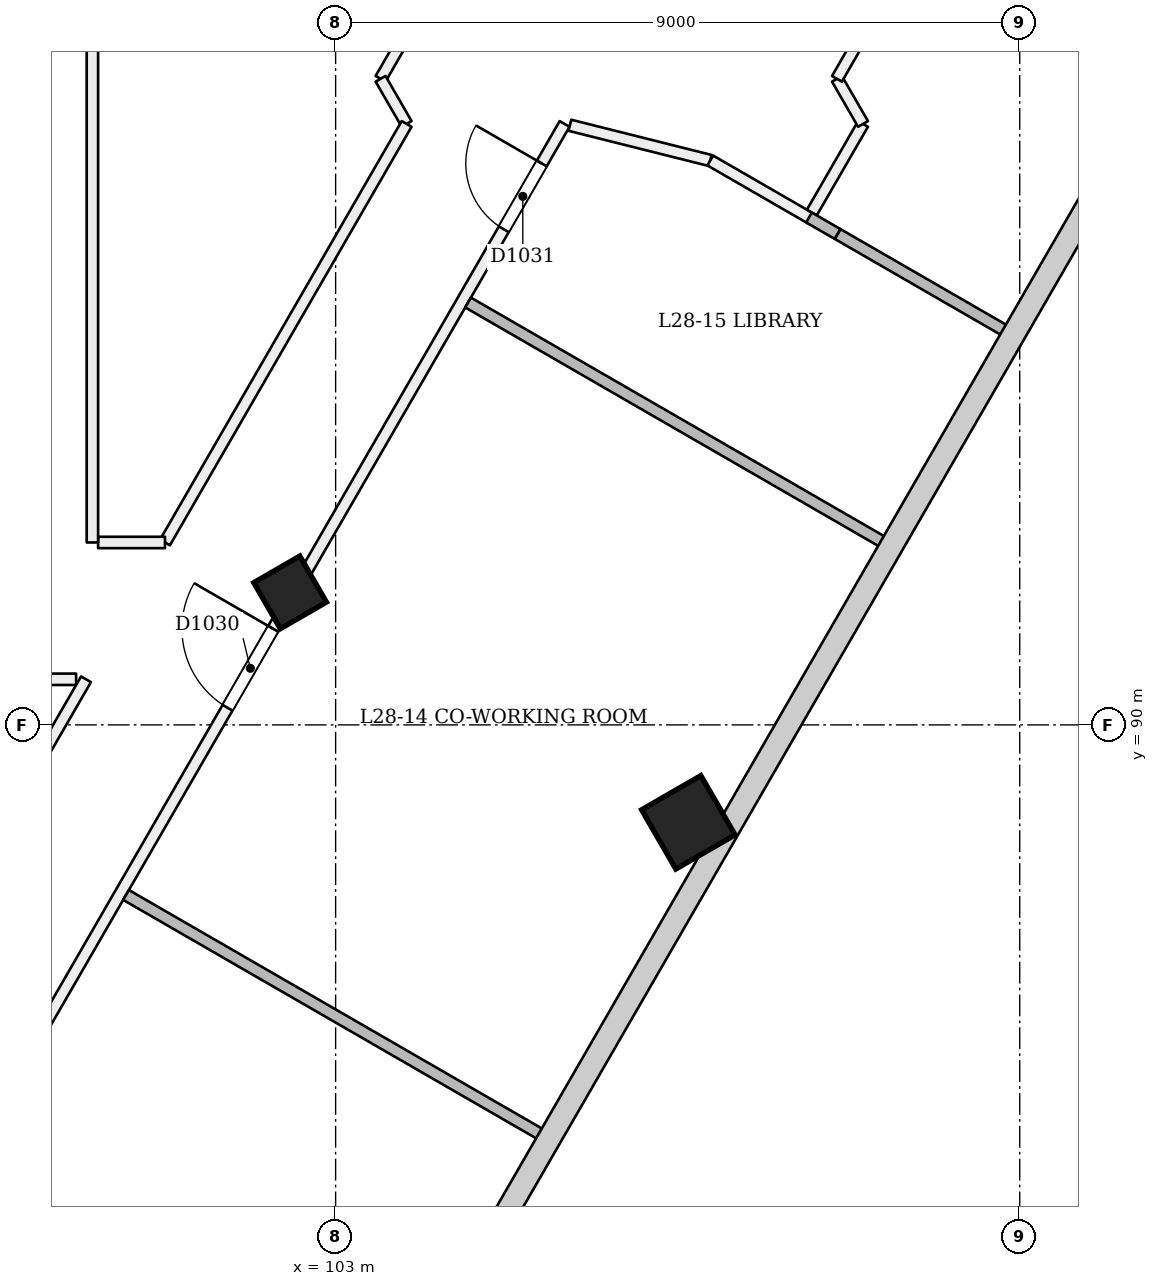
"""IFC4 building model, lengths in metres.
Left out: names, types, materials, properties, quantities, classifications, styles, units other than length and angle.
Written with IfcOpenShell. Run it as: python <this file> out.ifc"""

import sys

from ifc_helpers import new_model, si_unit, direction, frame, frame_2d, origin, origin_2d, place, context, subcontext, project, spatial, rectangle, extrude, element, fill, save


model = new_model("IFC4")
c1 = context("Model", 3, precision=1e-05, world=origin(), true_north=direction((0.0, 1.0)))
c2 = subcontext(c1, "Body", "Model", "MODEL_VIEW")
j1 = project(units=[si_unit("LENGTHUNIT", "METRE"), si_unit("PLANEANGLEUNIT", "RADIAN")], contexts=[c1])
p1 = place(None, origin())
s1 = spatial("IfcSite", under=j1, at=p1, CompositionType="ELEMENT")
p2 = place(p1, origin())
s2 = spatial("IfcBuilding", under=s1, at=p2, CompositionType="ELEMENT")
p3 = place(p2, frame((0.0, 0.0, 111.6)))
s3 = spatial("IfcBuildingStorey", under=s2, at=p3, CompositionType="ELEMENT", Elevation=111.6)
p4 = place(p3, frame((102.428, 91.696, -0.021), z_axis=(-0.022155133694, 0.038483534979, 0.999013597298), x_axis=(-0.501317552426, -0.864978472218, 0.022202572572)))
e1 = element("IfcColumn", 1, at=p4, inside=s3, PredefinedType="COLUMN", context=c2, shape_type="SweptSolid", body=[
    extrude(rectangle(XDim=0.7, YDim=0.7, at=origin_2d()), origin(), (0.0, 0.0, 1.0), 3.604),
])
p5 = place(p3, frame((107.668, 88.671, -0.027), z_axis=(-0.022222910879, 0.038415824599, 0.999014697916), x_axis=(-0.499512944036, -0.866022178858, 0.022190188523)))
e2 = element("IfcColumn", 2, at=p5, inside=s3, PredefinedType="COLUMN", context=c2, shape_type="SweptSolid", body=[
    extrude(rectangle(XDim=0.9, YDim=0.9, at=origin_2d()), origin(), (0.0, 0.0, 1.0), 3.604),
])
p6 = place(p3, frame((88.0, 90.599, 0.0), z_axis=(0.0, 0.0, 1.0), x_axis=(0.999999996448, 8.429038e-05, 0.0)))
e3 = element("IfcWall", 3, at=p6, inside=s3, PredefinedType="PARTITIONING", context=c2, shape_type="SweptSolid", body=[
    extrude(rectangle(XDim=11.586, YDim=0.15, at=frame_2d((5.793, 0.0))), origin(), (0.0, 0.0, 1.0), 3.1),
])
p7 = place(p6, frame((2.465, 0.0, 0.0)))
e4 = element("IfcOpeningElement", 4, at=p7, cuts=e3, PredefinedType="OPENING", context=c2, shape_type="SweptSolid", body=[
    extrude(rectangle(XDim=1.0, YDim=2.1, at=frame_2d((0.5, 1.05))), frame((0.0, 0.085, 0.0), z_axis=(0.0, -1.0, 0.0), x_axis=(1.0, 0.0, 0.0)), (0.0, 0.0, 1.0), 0.171),
])
p8 = place(p3, frame((99.716, 90.6, 0.0), z_axis=(0.0, 0.0, 1.0), x_axis=(-0.500001331159, -0.866024635238, 0.0)))
e5 = element("IfcWall", 5, at=p8, inside=s3, PredefinedType="PARTITIONING", context=c2, shape_type="SweptSolid", body=[
    extrude(rectangle(XDim=29.302, YDim=0.15, at=frame_2d((14.651, 0.0))), origin(), (0.0, 0.0, 1.0), 3.1),
])
p9 = place(p8, frame((2.192, 0.0, 0.0)))
e6 = element("IfcOpeningElement", 6, at=p9, cuts=e5, PredefinedType="OPENING", context=c2, shape_type="SweptSolid", body=[
    extrude(rectangle(XDim=0.9, YDim=2.1, at=frame_2d((0.45, 1.05))), frame((0.0, 0.085, 0.0), z_axis=(0.0, -1.0, 0.0), x_axis=(1.0, 0.0, 0.0)), (0.0, 0.0, 1.0), 0.171),
])
p10 = place(p8, frame((5.182, 0.0, 0.0)))
e7 = element("IfcOpeningElement", 7, at=p10, cuts=e5, PredefinedType="OPENING", context=c2, shape_type="SweptSolid", body=[
    extrude(rectangle(XDim=0.9, YDim=2.1, at=frame_2d((0.45, 1.05))), frame((0.0, 0.085, 0.0), z_axis=(0.0, -1.0, 0.0), x_axis=(1.0, 0.0, 0.0)), (0.0, 0.0, 1.0), 0.171),
])
p11 = place(p8, frame((15.001, 0.0, 0.0)))
e8 = element("IfcOpeningElement", 8, at=p11, cuts=e5, PredefinedType="OPENING", context=c2, shape_type="SweptSolid", body=[
    extrude(rectangle(XDim=1.0, YDim=2.1, at=frame_2d((0.5, 1.05))), frame((0.0, 0.085, 0.0), z_axis=(0.0, -1.0, 0.0), x_axis=(1.0, 0.0, 0.0)), (0.0, 0.0, 1.0), 0.171),
])
p12 = place(p8, frame((18.236, 0.0, 0.0)))
e9 = element("IfcOpeningElement", 9, at=p12, cuts=e5, PredefinedType="OPENING", context=c2, shape_type="SweptSolid", body=[
    extrude(rectangle(XDim=1.0, YDim=2.1, at=frame_2d((0.5, 1.05))), frame((0.0, 0.085, 0.0), z_axis=(0.0, -1.0, 0.0), x_axis=(1.0, 0.0, 0.0)), (0.0, 0.0, 1.0), 0.171),
])
p13 = place(p8, frame((8.514, 0.0, 0.0)))
e10 = element("IfcOpeningElement", 10, at=p13, cuts=e5, PredefinedType="OPENING", context=c2, shape_type="SweptSolid", body=[
    extrude(rectangle(XDim=1.0, YDim=2.1, at=frame_2d((0.5, 1.05))), frame((0.0, 0.085, 0.0), z_axis=(0.0, -1.0, 0.0), x_axis=(1.0, 0.0, 0.0)), (0.0, 0.0, 1.0), 0.171),
])
p14 = place(p8, frame((11.823, 0.0, 0.0)))
e11 = element("IfcOpeningElement", 11, at=p14, cuts=e5, PredefinedType="OPENING", context=c2, shape_type="SweptSolid", body=[
    extrude(rectangle(XDim=1.0, YDim=2.1, at=frame_2d((0.5, 1.05))), frame((0.0, 0.085, 0.0), z_axis=(0.0, -1.0, 0.0), x_axis=(1.0, 0.0, 0.0)), (0.0, 0.0, 1.0), 0.171),
])
p15 = place(p8, frame((22.054, 0.0, 0.0)))
e12 = element("IfcOpeningElement", 12, at=p15, cuts=e5, PredefinedType="OPENING", context=c2, shape_type="SweptSolid", body=[
    extrude(rectangle(XDim=1.0, YDim=2.1, at=frame_2d((0.5, 1.05))), frame((0.0, 0.085, 0.0), z_axis=(0.0, -1.0, 0.0), x_axis=(1.0, 0.0, 0.0)), (0.0, 0.0, 1.0), 0.171),
])
p16 = place(p3, frame((85.343, 62.105, 0.0), z_axis=(0.0, 0.0, 1.0), x_axis=(0.500001579174, 0.866024492046, 0.0)))
e13 = element("IfcWall", 13, at=p16, inside=s3, PredefinedType="PARTITIONING", context=c2, shape_type="SweptSolid", body=[
    extrude(rectangle(XDim=41.339, YDim=0.15, at=frame_2d((20.669, 0.0))), origin(), (0.0, 0.0, 1.0), 2.7),
])
p17 = place(p16, frame((0.312, 0.0, 0.0)))
e14 = element("IfcOpeningElement", 14, at=p17, cuts=e13, PredefinedType="OPENING", context=c2, shape_type="SweptSolid", body=[
    extrude(rectangle(XDim=1.2, YDim=2.1, at=frame_2d((0.6, 1.05))), frame((0.0, 0.085, 0.0), z_axis=(0.0, -1.0, 0.0), x_axis=(1.0, 0.0, 0.0)), (0.0, 0.0, 1.0), 0.171),
])
p18 = place(p16, frame((8.82, 0.0, 0.0)))
e15 = element("IfcOpeningElement", 15, at=p18, cuts=e13, PredefinedType="OPENING", context=c2, shape_type="SweptSolid", body=[
    extrude(rectangle(XDim=1.2, YDim=2.1, at=frame_2d((0.6, 1.05))), frame((0.0, 0.085, 0.0), z_axis=(0.0, -1.0, 0.0), x_axis=(1.0, 0.0, 0.0)), (0.0, 0.0, 1.0), 0.171),
])
p19 = place(p16, frame((22.32, 0.0, 0.0)))
e16 = element("IfcOpeningElement", 16, at=p19, cuts=e13, PredefinedType="OPENING", context=c2, shape_type="SweptSolid", body=[
    extrude(rectangle(XDim=1.2, YDim=2.1, at=frame_2d((0.6, 1.05))), frame((0.0, 0.085, 0.0), z_axis=(0.0, -1.0, 0.0), x_axis=(1.0, 0.0, 0.0)), (0.0, 0.0, 1.0), 0.171),
])
p20 = place(p16, frame((32.47, 0.0, 0.0)))
e17 = element("IfcOpeningElement", 17, at=p20, cuts=e13, PredefinedType="OPENING", context=c2, shape_type="SweptSolid", body=[
    extrude(rectangle(XDim=1.2, YDim=2.1, at=frame_2d((0.6, 1.05))), frame((0.0, 0.085, 0.0), z_axis=(0.0, -1.0, 0.0), x_axis=(1.0, 0.0, 0.0)), (0.0, 0.0, 1.0), 0.171),
])
p21 = place(p16, frame((39.739, 0.0, 0.0)))
e18 = element("IfcOpeningElement", 18, at=p21, cuts=e13, PredefinedType="OPENING", context=c2, shape_type="SweptSolid", body=[
    extrude(rectangle(XDim=1.0, YDim=2.1, at=frame_2d((0.5, 1.05))), frame((0.0, 0.085, 0.0), z_axis=(0.0, -1.0, 0.0), x_axis=(1.0, 0.0, 0.0)), (0.0, 0.0, 1.0), 0.171),
])
p22 = place(p3, frame((106.082, 97.889, 0.0), z_axis=(0.0, 0.0, 1.0), x_axis=(0.969923333145, -0.24341061567, 0.0)))
e19 = element("IfcWall", 19, at=p22, inside=s3, PredefinedType="PARTITIONING", context=c2, shape_type="SweptSolid", body=[
    extrude(rectangle(XDim=1.904, YDim=0.15, at=frame_2d((0.952, 0.0))), origin(), (0.0, 0.0, 1.0), 3.1),
])
p23 = place(p3, frame((107.929, 97.425, 0.0), z_axis=(0.0, 0.0, 1.0), x_axis=(0.866030456496, -0.499991248344, 0.0)))
e20 = element("IfcWall", 20, at=p23, inside=s3, PredefinedType="PARTITIONING", context=c2, shape_type="SweptSolid", body=[
    extrude(rectangle(XDim=1.52, YDim=0.15, at=frame_2d((0.76, 0.0))), origin(), (0.0, 0.0, 1.0), 2.6),
])
p24 = place(p3, frame((109.265, 96.74, 0.0), z_axis=(0.0, 0.0, 1.0), x_axis=(0.500078207394, 0.865980246016, 0.0)))
e21 = element("IfcWall", 21, at=p24, inside=s3, PredefinedType="PARTITIONING", context=c2, shape_type="SweptSolid", body=[
    extrude(rectangle(XDim=1.346, YDim=0.15, at=frame_2d((0.673, 0.0))), origin(), (0.0, 0.0, 1.0), 2.6),
])
p25 = place(p3, frame((109.938, 97.906, 0.0), z_axis=(0.0, 0.0, 1.0), x_axis=(-0.500236074689, 0.865889063091, 0.0)))
e22 = element("IfcWall", 22, at=p25, inside=s3, PredefinedType="PARTITIONING", context=c2, shape_type="SweptSolid", body=[
    extrude(rectangle(XDim=0.686, YDim=0.15, at=frame_2d((0.343, 0.0))), origin(), (0.0, 0.0, 1.0), 2.6),
])
p26 = place(p3, frame((109.595, 98.5, 0.0), z_axis=(0.0, 0.0, 1.0), x_axis=(0.500072327845, 0.865983641256, 0.0)))
e23 = element("IfcWall", 23, at=p26, inside=s3, PredefinedType="PARTITIONING", context=c2, shape_type="SweptSolid", body=[
    extrude(rectangle(XDim=2.517, YDim=0.15, at=frame_2d((1.258, 0.0))), origin(), (0.0, 0.0, 1.0), 2.6),
])
p27 = place(p3, frame((104.688, 100.4, 0.0), z_axis=(0.0, 0.0, 1.0), x_axis=(-0.500005024956, -0.866022502605, 0.0)))
e24 = element("IfcWall", 24, at=p27, inside=s3, PredefinedType="PARTITIONING", context=c2, shape_type="SweptSolid", body=[
    extrude(rectangle(XDim=2.194, YDim=0.15, at=frame_2d((1.097, 0.0))), origin(), (0.0, 0.0, 1.0), 3.1),
])
p28 = place(p3, frame((103.591, 98.5, 0.0), z_axis=(0.0, 0.0, 1.0), x_axis=(0.499969057507, -0.866043267704, 0.0)))
e25 = element("IfcWall", 25, at=p28, inside=s3, PredefinedType="PARTITIONING", context=c2, shape_type="SweptSolid", body=[
    extrude(rectangle(XDim=0.686, YDim=0.15, at=frame_2d((0.343, 0.0))), origin(), (0.0, 0.0, 1.0), 3.1),
])
p29 = place(p3, frame((103.934, 97.906, 0.0), z_axis=(0.0, 0.0, 1.0), x_axis=(-0.499983931063, -0.866034680991, 0.0)))
e26 = element("IfcWall", 26, at=p29, inside=s3, PredefinedType="PARTITIONING", context=c2, shape_type="SweptSolid", body=[
    extrude(rectangle(XDim=6.358, YDim=0.15, at=frame_2d((3.179, 0.0))), origin(), (0.0, 0.0, 1.0), 3.1),
])
p30 = place(p3, frame((100.755, 92.4, 0.0), z_axis=(0.0, 0.0, 1.0), x_axis=(-1.0, 0.0, 0.0)))
e27 = element("IfcWall", 27, at=p30, inside=s3, PredefinedType="PARTITIONING", context=c2, shape_type="SweptSolid", body=[
    extrude(rectangle(XDim=0.88, YDim=0.15, at=frame_2d((0.44, 0.0))), origin(), (0.0, 0.0, 1.0), 3.1),
])
p31 = place(p3, frame((99.8, 92.4, 0.0), z_axis=(0.0, 0.0, 1.0), x_axis=(0.0, 1.0, 0.0)))
e28 = element("IfcWall", 28, at=p31, inside=s3, PredefinedType="PARTITIONING", context=c2, shape_type="SweptSolid", body=[
    extrude(rectangle(XDim=11.5, YDim=0.15, at=frame_2d((5.75, 0.0))), origin(), (0.0, 0.0, 1.0), 2.6),
])
p32 = place(p31, frame((7.425, 0.0, 0.0)))
e29 = element("IfcOpeningElement", 29, at=p32, cuts=e28, PredefinedType="OPENING", context=c2, shape_type="SweptSolid", body=[
    extrude(rectangle(XDim=1.2, YDim=2.1, at=frame_2d((0.6, 1.05))), frame((0.0, 0.085, 0.0), z_axis=(0.0, -1.0, 0.0), x_axis=(1.0, 0.0, 0.0)), (0.0, 0.0, 1.0), 0.171),
])
for number, where, z_axis, x_axis in (
    (30, (105.72, 84.6, 0.0), (0.0, 0.0, 1.0), (-0.866, 0.5, 0.0)),
    (31, (110.22, 92.394, 0.0), (0.0, 0.0, 1.0), (-0.866, 0.5, 0.0)),
):
    element("IfcWall", number, at=place(p3, frame(where, z_axis=z_axis, x_axis=x_axis)), inside=s3, PredefinedType="PARTITIONING", context=c2, shape_type="SweptSolid", body=[
        extrude(rectangle(XDim=6.325, YDim=0.15, at=frame_2d((3.163, 0.0))), origin(), (0.0, 0.0, 1.0), 2.6),
    ])
p33 = place(p3, frame((111.826, 95.175, 0.0), z_axis=(0.0, 0.0, 1.0), x_axis=(-0.866009728883, 0.500027148743, 0.0)))
e32 = element("IfcWall", 32, at=p33, inside=s3, PredefinedType="PARTITIONING", context=c2, shape_type="SweptSolid", body=[
    extrude(rectangle(XDim=2.566, YDim=0.15, at=frame_2d((1.283, 0.0))), origin(), (0.0, 0.0, 1.0), 3.1),
])
p34 = place(p3, frame((109.603, 96.458, 0.0), z_axis=(0.0, 0.0, 1.0), x_axis=(-0.866016800201, 0.500014901547, 0.0)))
e33 = element("IfcWall", 33, at=p34, inside=s3, PredefinedType="PARTITIONING", context=c2, shape_type="SweptSolid", body=[
    extrude(rectangle(XDim=0.434, YDim=0.15, at=frame_2d((0.217, 0.0))), origin(), (0.0, 0.0, 1.0), 2.6),
])
p35 = place(p20, origin())
e34 = element("IfcDoor", 34, at=p35, inside=s3, OperationType="SINGLE_SWING_RIGHT", PredefinedType="NOTDEFINED", context=c2, shape_type="SweptSolid", body=[
    extrude(rectangle(XDim=1.2, YDim=2.1, at=frame_2d((0.6, 1.05))), frame((0.0, 0.025, 0.0), z_axis=(0.0, -1.0, 0.0), x_axis=(1.0, 0.0, 0.0)), (0.0, 0.0, 1.0), 0.05),
])
fill(e17, e34)
p36 = place(p21, origin())
e35 = element("IfcDoor", 35, at=p36, inside=s3, OperationType="SINGLE_SWING_RIGHT", PredefinedType="NOTDEFINED", context=c2, shape_type="SweptSolid", body=[
    extrude(rectangle(XDim=1.0, YDim=2.1, at=frame_2d((0.5, 1.05))), frame((0.0, 0.025, 0.0), z_axis=(0.0, -1.0, 0.0), x_axis=(1.0, 0.0, 0.0)), (0.0, 0.0, 1.0), 0.05),
])
fill(e18, e35)
save(model, sys.argv[1])
